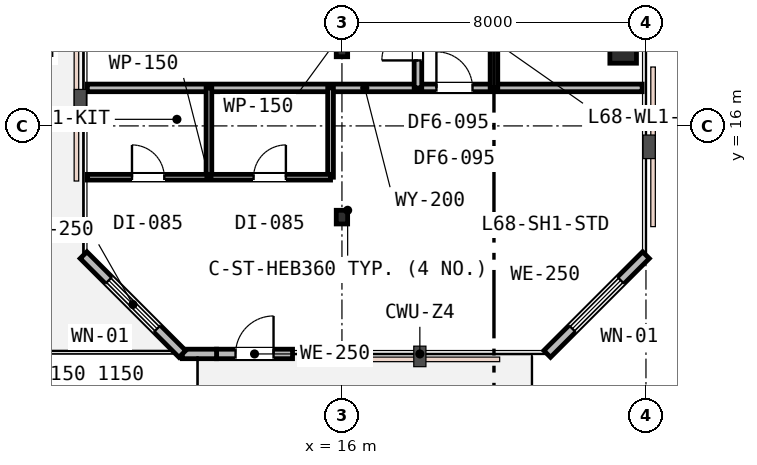
"""IFC4 building model, lengths in metres.
Left out: names, types, materials, properties, quantities, classifications, styles, units other than length and angle.
Written with IfcOpenShell. Run it as: python <this file> out.ifc"""

import sys

from ifc_helpers import new_model, si_unit, direction, frame, frame_2d, origin, origin_2d, place, context, subcontext, project, spatial, rectangle, i_section, extrude, element, fill, save


model = new_model("IFC4")
c1 = context("Model", 3, precision=1e-05, world=origin(), true_north=direction((0.0, 1.0)))
c2 = subcontext(c1, "Body", "Model", "MODEL_VIEW")
j1 = project(units=[si_unit("LENGTHUNIT", "METRE"), si_unit("PLANEANGLEUNIT", "RADIAN")], contexts=[c1])
p1 = place(None, origin())
s1 = spatial("IfcSite", under=j1, at=p1, CompositionType="ELEMENT")
p2 = place(p1, origin())
s2 = spatial("IfcBuilding", under=s1, at=p2, CompositionType="ELEMENT")
p3 = place(p2, frame((0.0, 0.0, 264.0)))
s3 = spatial("IfcBuildingStorey", under=s2, at=p3, CompositionType="ELEMENT", Elevation=264.0)
p4 = place(p3, frame((23.4, 18.0, 0.0), z_axis=(0.0, 0.0, 1.0), x_axis=(1.0, 0.0, 0.0)))
e1 = element("IfcColumn", 1, at=p4, inside=s3, PredefinedType="COLUMN", context=c2, shape_type="SweptSolid", body=[
    extrude(rectangle(XDim=0.7, YDim=0.7, at=origin_2d()), origin(), (0.0, 0.0, 1.0), 3.8),
])
for number, where, z_axis, x_axis in (
    (2, (16.0, 13.6, 0.0), (0.0, 0.0, 1.0), (1.0, 0.0, 0.0)),
    (3, (16.0, 18.0, 0.0), (0.0, 0.0, 1.0), (1.0, 0.0, 0.0)),
):
    element("IfcColumn", number, at=place(p3, frame(where, z_axis=z_axis, x_axis=x_axis)), inside=s3, PredefinedType="COLUMN", context=c2, shape_type="SweptSolid", body=[
        extrude(i_section(OverallWidth=0.3, OverallDepth=0.36, WebThickness=0.013, FlangeThickness=0.022, FilletRadius=0.027, at=origin_2d()), origin(), (0.0, 0.0, 1.0), 3.8),
    ])
p5 = place(p3, frame((12.7, 10.0, 0.0), z_axis=(0.0, 0.0, 1.0), x_axis=(1.0, 0.0, 0.0)))
e4 = element("IfcWall", 4, at=p5, inside=s3, PredefinedType="STANDARD", context=c2, shape_type="SweptSolid", body=[
    extrude(rectangle(XDim=2.0, YDim=0.25, at=frame_2d((1.0, 0.0))), origin(), (0.0, 0.0, 1.0), 3.53),
])
p6 = place(p5, frame((0.5, 0.0, 0.0)))
e5 = element("IfcOpeningElement", 5, at=p6, cuts=e4, PredefinedType="OPENING", context=c2, shape_type="SweptSolid", body=[
    extrude(rectangle(XDim=1.0, YDim=2.15, at=frame_2d((0.5, 1.075))), frame((0.0, 0.135, 0.0), z_axis=(0.0, -1.0, 0.0), x_axis=(1.0, 0.0, 0.0)), (0.0, 0.0, 1.0), 0.27),
])
p7 = place(p3, frame((11.8, 10.0, 0.0), z_axis=(0.0, 0.0, 1.0), x_axis=(1.0, 0.0, 0.0)))
e6 = element("IfcWall", 6, at=p7, inside=s3, PredefinedType="STANDARD", context=c2, shape_type="SweptSolid", body=[
    extrude(rectangle(XDim=0.9, YDim=0.25, at=frame_2d((0.45, 0.0))), origin(), (0.0, 0.0, 1.0), 3.53),
])
p8 = place(p3, frame((21.4, 10.0, 0.0), z_axis=(0.0, 0.0, 1.0), x_axis=(0.707106781187, 0.707106781187, 0.0)))
e7 = element("IfcWall", 7, at=p8, inside=s3, PredefinedType="STANDARD", context=c2, shape_type="SweptSolid", body=[
    extrude(rectangle(XDim=3.677, YDim=0.25, at=frame_2d((1.839, 0.0))), origin(), (0.0, 0.0, 1.0), 3.53),
])
p9 = place(p8, frame((0.939, 0.0, 0.75)))
e8 = element("IfcOpeningElement", 8, at=p9, cuts=e7, PredefinedType="OPENING", context=c2, shape_type="SweptSolid", body=[
    extrude(rectangle(XDim=1.8, YDim=1.85, at=frame_2d((0.9, 0.925))), frame((0.0, 0.135, 0.0), z_axis=(0.0, -1.0, 0.0), x_axis=(1.0, 0.0, 0.0)), (0.0, 0.0, 1.0), 0.27),
])
p10 = place(p3, frame((9.2, 12.6, 0.0), z_axis=(0.0, 0.0, 1.0), x_axis=(0.707106781187, -0.707106781187, 0.0)))
e9 = element("IfcWall", 9, at=p10, inside=s3, PredefinedType="STANDARD", context=c2, shape_type="SweptSolid", body=[
    extrude(rectangle(XDim=3.677, YDim=0.25, at=frame_2d((1.839, 0.0))), origin(), (0.0, 0.0, 1.0), 3.53),
])
p11 = place(p10, frame((0.939, 0.0, 0.75)))
e10 = element("IfcOpeningElement", 10, at=p11, cuts=e9, PredefinedType="OPENING", context=c2, shape_type="SweptSolid", body=[
    extrude(rectangle(XDim=1.8, YDim=1.85, at=frame_2d((0.9, 0.925))), frame((0.0, 0.135, 0.0), z_axis=(0.0, -1.0, 0.0), x_axis=(1.0, 0.0, 0.0)), (0.0, 0.0, 1.0), 0.27),
])
p12 = place(p3, frame((9.3, 17.0, 0.0), z_axis=(0.0, 0.0, 1.0), x_axis=(1.0, 0.0, 0.0)))
e11 = element("IfcWall", 11, at=p12, inside=s3, PredefinedType="PARTITIONING", context=c2, shape_type="SweptSolid", body=[
    extrude(rectangle(XDim=14.6, YDim=0.2, at=frame_2d((7.3, 0.0))), origin(), (0.0, 0.0, 1.0), 3.16),
])
p13 = place(p12, frame((9.186, 0.0, 0.0)))
e12 = element("IfcOpeningElement", 12, at=p13, cuts=e11, PredefinedType="OPENING", context=c2, shape_type="SweptSolid", body=[
    extrude(rectangle(XDim=0.95, YDim=2.15, at=frame_2d((0.475, 1.075))), frame((0.0, 0.11, 0.0), z_axis=(0.0, -1.0, 0.0), x_axis=(1.0, 0.0, 0.0)), (0.0, 0.0, 1.0), 0.22),
])
p14 = place(p3, frame((18.0, 17.0, 0.0), z_axis=(0.0, 0.0, 1.0), x_axis=(0.0, 1.0, 0.0)))
e13 = element("IfcWall", 13, at=p14, inside=s3, PredefinedType="PARTITIONING", context=c2, shape_type="SweptSolid", body=[
    extrude(rectangle(XDim=11.6, YDim=0.2, at=frame_2d((5.8, 0.0))), origin(), (0.0, 0.0, 1.0), 3.16),
])
p15 = place(p14, frame((0.723, 0.0, 0.0)))
e14 = element("IfcOpeningElement", 14, at=p15, cuts=e13, PredefinedType="OPENING", context=c2, shape_type="SweptSolid", body=[
    extrude(rectangle(XDim=0.95, YDim=2.15, at=frame_2d((0.475, 1.075))), frame((0.0, 0.11, 0.0), z_axis=(0.0, -1.0, 0.0), x_axis=(1.0, 0.0, 0.0)), (0.0, 0.0, 1.0), 0.22),
])
p16 = place(p3, frame((20.0, 17.0, 0.0), z_axis=(0.0, 0.0, 1.0), x_axis=(0.0, 1.0, 0.0)))
e15 = element("IfcWall", 15, at=p16, inside=s3, PredefinedType="PARTITIONING", context=c2, shape_type="SweptSolid", body=[
    extrude(rectangle(XDim=11.6, YDim=0.2, at=frame_2d((5.8, 0.0))), origin(), (0.0, 0.0, 1.0), 3.16),
])
p17 = place(p16, frame((3.125, 0.0, 0.0)))
e16 = element("IfcOpeningElement", 16, at=p17, cuts=e15, PredefinedType="OPENING", context=c2, shape_type="SweptSolid", body=[
    extrude(rectangle(XDim=0.95, YDim=2.15, at=frame_2d((0.475, 1.075))), frame((0.0, 0.11, 0.0), z_axis=(0.0, -1.0, 0.0), x_axis=(1.0, 0.0, 0.0)), (0.0, 0.0, 1.0), 0.22),
])
p18 = place(p3, frame((15.7, 14.65, 0.0), z_axis=(0.0, 0.0, 1.0), x_axis=(0.0, 1.0, 0.0)))
e17 = element("IfcWall", 17, at=p18, inside=s3, PredefinedType="PARTITIONING", context=c2, shape_type="SweptSolid", body=[
    extrude(rectangle(XDim=2.35, YDim=0.15, at=frame_2d((1.175, 0.0))), origin(), (0.0, 0.0, 1.0), 3.16),
])
p19 = place(p3, frame((12.5, 14.65, 0.0), z_axis=(0.0, 0.0, 1.0), x_axis=(0.0, 1.0, 0.0)))
e18 = element("IfcWall", 18, at=p19, inside=s3, PredefinedType="PARTITIONING", context=c2, shape_type="SweptSolid", body=[
    extrude(rectangle(XDim=2.35, YDim=0.15, at=frame_2d((1.175, 0.0))), origin(), (0.0, 0.0, 1.0), 3.53),
])
p20 = place(p3, frame((9.3, 14.65, 0.0), z_axis=(0.0, 0.0, 1.0), x_axis=(1.0, 0.0, 0.0)))
e19 = element("IfcWall", 19, at=p20, inside=s3, PredefinedType="PARTITIONING", context=c2, shape_type="SweptSolid", body=[
    extrude(rectangle(XDim=6.4, YDim=0.15, at=frame_2d((3.2, 0.0))), origin(), (0.0, 0.0, 1.0), 3.16),
])
p21 = place(p20, frame((1.175, 0.0, 0.0)))
e20 = element("IfcOpeningElement", 20, at=p21, cuts=e19, PredefinedType="OPENING", context=c2, shape_type="SweptSolid", body=[
    extrude(rectangle(XDim=0.85, YDim=2.15, at=frame_2d((0.425, 1.075))), frame((0.0, 0.085, 0.0), z_axis=(0.0, -1.0, 0.0), x_axis=(1.0, 0.0, 0.0)), (0.0, 0.0, 1.0), 0.17),
])
p22 = place(p20, frame((4.375, 0.0, 0.0)))
e21 = element("IfcOpeningElement", 21, at=p22, cuts=e19, PredefinedType="OPENING", context=c2, shape_type="SweptSolid", body=[
    extrude(rectangle(XDim=0.85, YDim=2.15, at=frame_2d((0.425, 1.075))), frame((0.0, 0.085, 0.0), z_axis=(0.0, -1.0, 0.0), x_axis=(1.0, 0.0, 0.0)), (0.0, 0.0, 1.0), 0.17),
])
p23 = place(p6, origin())
e22 = element("IfcDoor", 22, at=p23, inside=s3, OperationType="SINGLE_SWING_RIGHT", PredefinedType="DOOR", context=c2, shape_type="SweptSolid", body=[
    extrude(rectangle(XDim=1.0, YDim=2.15, at=frame_2d((0.5, 1.075))), frame((0.0, 0.025, 0.0), z_axis=(0.0, -1.0, 0.0), x_axis=(1.0, 0.0, 0.0)), (0.0, 0.0, 1.0), 0.05),
])
fill(e5, e22)
p24 = place(p9, origin())
e23 = element("IfcWindow", 23, at=p24, inside=s3, PartitioningType="SINGLE_PANEL", PredefinedType="WINDOW", context=c2, shape_type="SweptSolid", body=[
    extrude(rectangle(XDim=1.8, YDim=1.85, at=frame_2d((0.9, 0.925))), frame((0.0, 0.03, 0.0), z_axis=(0.0, -1.0, 0.0), x_axis=(1.0, 0.0, 0.0)), (0.0, 0.0, 1.0), 0.06),
])
fill(e8, e23)
p25 = place(p11, origin())
e24 = element("IfcWindow", 24, at=p25, inside=s3, PartitioningType="SINGLE_PANEL", PredefinedType="WINDOW", context=c2, shape_type="SweptSolid", body=[
    extrude(rectangle(XDim=1.8, YDim=1.85, at=frame_2d((0.9, 0.925))), frame((0.0, 0.03, 0.0), z_axis=(0.0, -1.0, 0.0), x_axis=(1.0, 0.0, 0.0)), (0.0, 0.0, 1.0), 0.06),
])
fill(e10, e24)
p26 = place(p15, origin())
e25 = element("IfcDoor", 25, at=p26, inside=s3, OperationType="SINGLE_SWING_LEFT", PredefinedType="DOOR", context=c2, shape_type="SweptSolid", body=[
    extrude(rectangle(XDim=0.95, YDim=2.15, at=frame_2d((0.475, 1.075))), frame((0.0, 0.025, 0.0), z_axis=(0.0, -1.0, 0.0), x_axis=(1.0, 0.0, 0.0)), (0.0, 0.0, 1.0), 0.05),
])
fill(e14, e25)
p27 = place(p13, origin())
e26 = element("IfcDoor", 26, at=p27, inside=s3, OperationType="SINGLE_SWING_LEFT", PredefinedType="DOOR", context=c2, shape_type="SweptSolid", body=[
    extrude(rectangle(XDim=0.95, YDim=2.15, at=frame_2d((0.475, 1.075))), frame((0.0, 0.025, 0.0), z_axis=(0.0, -1.0, 0.0), x_axis=(1.0, 0.0, 0.0)), (0.0, 0.0, 1.0), 0.05),
])
fill(e12, e26)
p28 = place(p21, origin())
e27 = element("IfcDoor", 27, at=p28, inside=s3, OperationType="SINGLE_SWING_LEFT", PredefinedType="DOOR", context=c2, shape_type="SweptSolid", body=[
    extrude(rectangle(XDim=0.85, YDim=2.15, at=frame_2d((0.425, 1.075))), frame((0.0, 0.025, 0.0), z_axis=(0.0, -1.0, 0.0), x_axis=(1.0, 0.0, 0.0)), (0.0, 0.0, 1.0), 0.05),
])
fill(e20, e27)
p29 = place(p22, origin())
e28 = element("IfcDoor", 28, at=p29, inside=s3, OperationType="SINGLE_SWING_RIGHT", PredefinedType="DOOR", context=c2, shape_type="SweptSolid", body=[
    extrude(rectangle(XDim=0.85, YDim=2.15, at=frame_2d((0.425, 1.075))), frame((0.0, 0.025, 0.0), z_axis=(0.0, -1.0, 0.0), x_axis=(1.0, 0.0, 0.0)), (0.0, 0.0, 1.0), 0.05),
])
fill(e21, e28)
save(model, sys.argv[1])
